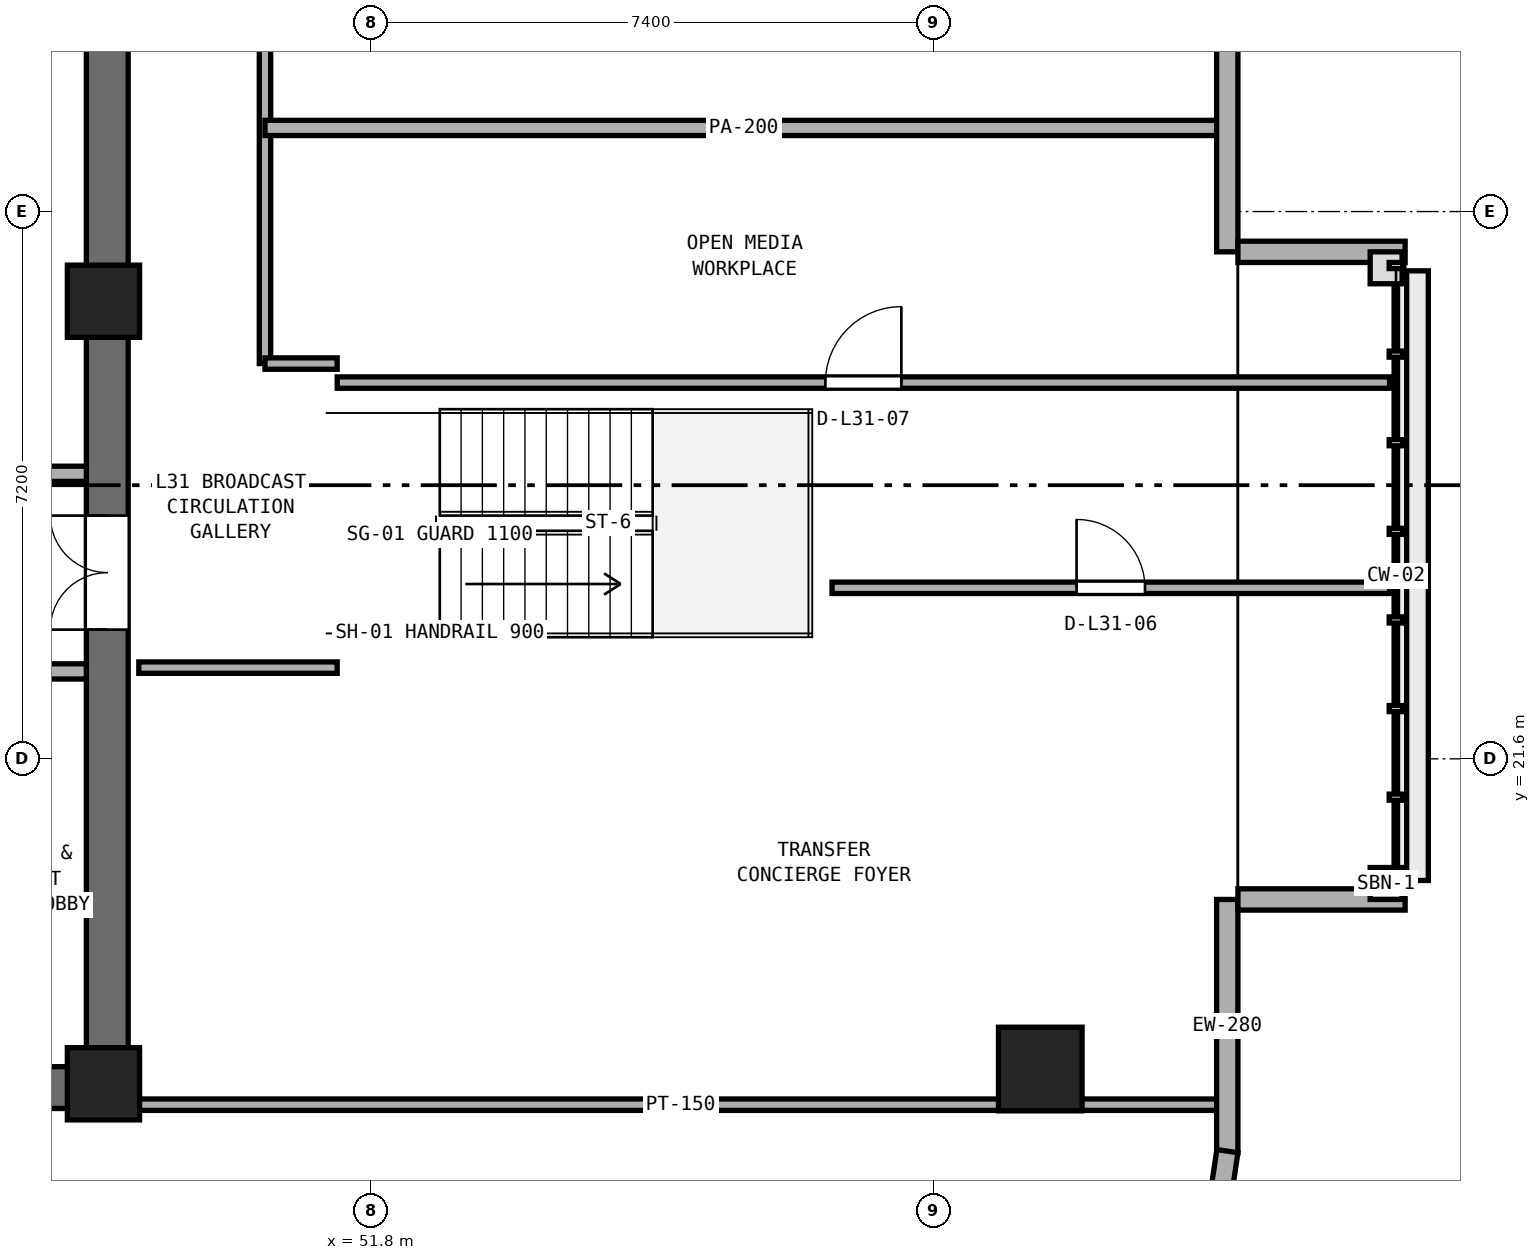
"""IFC4 building model, lengths in metres.
Left out: names, types, materials, properties, quantities, classifications, styles, units other than length and angle.
Written with IfcOpenShell. Run it as: python <this file> out.ifc"""

import sys

from ifc_helpers import new_model, si_unit, direction, frame, frame_2d, origin, origin_2d, place, context, subcontext, project, spatial, rectangle, extrude, element, fill, save


model = new_model("IFC4")
c1 = context("Model", 3, precision=1e-05, world=origin(), true_north=direction((0.0, 1.0)))
c2 = subcontext(c1, "Body", "Model", "MODEL_VIEW")
j1 = project(units=[si_unit("LENGTHUNIT", "METRE"), si_unit("PLANEANGLEUNIT", "RADIAN")], contexts=[c1])
p1 = place(None, origin())
s1 = spatial("IfcSite", under=j1, at=p1, CompositionType="ELEMENT")
p2 = place(p1, origin())
s2 = spatial("IfcBuilding", under=s1, at=p2, CompositionType="ELEMENT")
p3 = place(p2, frame((0.0, 0.0, 125.0)))
s3 = spatial("IfcBuildingStorey", under=s2, at=p3, CompositionType="ELEMENT", Elevation=125.0)
p4 = place(p3, frame((25.4, 17.275, 0.0), z_axis=(0.0, 0.0, 1.0), x_axis=(1.0, 0.0, 0.0)))
e1 = element("IfcWall", 1, at=p4, inside=s3, PredefinedType="SHEAR", context=c2, shape_type="SweptSolid", body=[
    extrude(rectangle(XDim=23.2, YDim=0.55, at=frame_2d((11.6, 0.0))), origin(), (0.0, 0.0, 1.0), 3.54),
])
p5 = place(p3, frame((48.325, 17.55, 0.0), z_axis=(0.0, 0.0, 1.0), x_axis=(0.0, 1.0, 0.0)))
e2 = element("IfcWall", 2, at=p5, inside=s3, PredefinedType="SHEAR", context=c2, shape_type="SweptSolid", body=[
    extrude(rectangle(XDim=15.3, YDim=0.55, at=frame_2d((7.65, 0.0))), origin(), (0.0, 0.0, 1.0), 3.54),
])
p6 = place(p5, frame((5.75, 0.0, 0.0)))
e3 = element("IfcOpeningElement", 3, at=p6, cuts=e2, PredefinedType="OPENING", context=c2, shape_type="SweptSolid", body=[
    extrude(rectangle(XDim=1.5, YDim=2.15, at=frame_2d((0.75, 1.075))), frame((0.0, 0.285, 0.0), z_axis=(0.0, -1.0, 0.0), x_axis=(1.0, 0.0, 0.0)), (0.0, 0.0, 1.0), 0.57),
])
for number, where, z_axis, x_axis in (
    (4, (48.275, 17.325, 0.0), (0.0, 0.0, 1.0), (1.0, 0.0, 0.0)),
    (5, (48.275, 27.62, 0.0), (0.0, 0.0, 1.0), (1.0, 0.0, 0.0)),
):
    element("IfcColumn", number, at=place(p3, frame(where, z_axis=z_axis, x_axis=x_axis)), inside=s3, PredefinedType="PILASTER", context=c2, shape_type="SweptSolid", body=[
        extrude(rectangle(XDim=0.95, YDim=0.95, at=origin_2d()), origin(), (0.0, 0.0, 1.0), 3.8),
    ])
p7 = place(p3, frame((60.6, 17.519, 0.0), z_axis=(0.0, 0.0, 1.0), x_axis=(1.0, 0.0, 0.0)))
e6 = element("IfcColumn", 6, at=p7, inside=s3, PredefinedType="COLUMN", context=c2, shape_type="SweptSolid", body=[
    extrude(rectangle(XDim=1.1, YDim=1.1, at=origin_2d()), origin(), (0.0, 0.0, 1.0), 3.8),
])
p8 = place(p3, frame((42.0, 22.75, 0.0), z_axis=(0.0, 0.0, 1.0), x_axis=(1.0, 0.0, 0.0)))
e7 = element("IfcWall", 7, at=p8, inside=s3, PredefinedType="SOLIDWALL", context=c2, shape_type="SweptSolid", body=[
    extrude(rectangle(XDim=6.05, YDim=0.2, at=frame_2d((3.025, 0.0))), origin(), (0.0, 0.0, 1.0), 3.54),
])
p9 = place(p3, frame((46.1, 25.35, 0.0), z_axis=(0.0, 0.0, 1.0), x_axis=(1.0, 0.0, 0.0)))
e8 = element("IfcWall", 8, at=p9, inside=s3, PredefinedType="SOLIDWALL", context=c2, shape_type="SweptSolid", body=[
    extrude(rectangle(XDim=1.95, YDim=0.2, at=frame_2d((0.975, 0.0))), origin(), (0.0, 0.0, 1.0), 3.54),
])
p10 = place(p3, frame((50.4, 26.8, 0.0), z_axis=(0.0, 0.0, 1.0), x_axis=(0.0, 1.0, 0.0)))
e9 = element("IfcWall", 9, at=p10, inside=s3, PredefinedType="PARTITIONING", context=c2, shape_type="SweptSolid", body=[
    extrude(rectangle(XDim=8.4, YDim=0.15, at=frame_2d((4.2, 0.0))), origin(), (0.0, 0.0, 1.0), 3.54),
])
p11 = place(p10, frame((4.375, 0.0, 0.0)))
e10 = element("IfcOpeningElement", 10, at=p11, cuts=e9, PredefinedType="OPENING", context=c2, shape_type="SweptSolid", body=[
    extrude(rectangle(XDim=0.9, YDim=2.1, at=frame_2d((0.45, 1.05))), frame((0.0, 0.085, 0.0), z_axis=(0.0, -1.0, 0.0), x_axis=(1.0, 0.0, 0.0)), (0.0, 0.0, 1.0), 0.17),
])
p12 = place(p3, frame((48.74, 17.05, 0.0), z_axis=(0.0, 0.0, 1.0), x_axis=(1.0, 0.0, 0.0)))
e11 = element("IfcWall", 11, at=p12, inside=s3, PredefinedType="PARTITIONING", context=c2, shape_type="SweptSolid", body=[
    extrude(rectangle(XDim=14.255, YDim=0.15, at=frame_2d((7.127, 0.0))), origin(), (0.0, 0.0, 1.0), 2.79),
])
p13 = place(p3, frame((48.74, 22.8, 0.0), z_axis=(0.0, 0.0, 1.0), x_axis=(1.0, 0.0, 0.0)))
e12 = element("IfcWall", 12, at=p13, inside=s3, PredefinedType="PARTITIONING", context=c2, shape_type="SweptSolid", body=[
    extrude(rectangle(XDim=2.61, YDim=0.15, at=frame_2d((1.305, 0.0))), origin(), (0.0, 0.0, 1.0), 3.54),
])
p14 = place(p3, frame((57.86, 23.85, 0.0), z_axis=(0.0, 0.0, 1.0), x_axis=(1.0, 0.0, 0.0)))
e13 = element("IfcWall", 13, at=p14, inside=s3, PredefinedType="PARTITIONING", context=c2, shape_type="SweptSolid", body=[
    extrude(rectangle(XDim=7.335, YDim=0.15, at=frame_2d((3.667, 0.0))), origin(), (0.0, 0.0, 1.0), 3.54),
])
p15 = place(p14, frame((3.218, 0.0, 0.0)))
e14 = element("IfcOpeningElement", 14, at=p15, cuts=e13, PredefinedType="OPENING", context=c2, shape_type="SweptSolid", body=[
    extrude(rectangle(XDim=0.9, YDim=2.1, at=frame_2d((0.45, 1.05))), frame((0.0, 0.085, 0.0), z_axis=(0.0, -1.0, 0.0), x_axis=(1.0, 0.0, 0.0)), (0.0, 0.0, 1.0), 0.17),
])
p16 = place(p3, frame((51.35, 26.55, 0.0), z_axis=(0.0, 0.0, 1.0), x_axis=(1.0, 0.0, 0.0)))
e15 = element("IfcWall", 15, at=p16, inside=s3, PredefinedType="PARTITIONING", context=c2, shape_type="SweptSolid", body=[
    extrude(rectangle(XDim=13.845, YDim=0.15, at=frame_2d((6.922, 0.0))), origin(), (0.0, 0.0, 1.0), 3.54),
])
p17 = place(p16, frame((6.423, 0.0, 0.0)))
e16 = element("IfcOpeningElement", 16, at=p17, cuts=e15, PredefinedType="OPENING", context=c2, shape_type="SweptSolid", body=[
    extrude(rectangle(XDim=1.0, YDim=2.12, at=frame_2d((0.5, 1.06))), frame((0.0, 0.085, 0.0), z_axis=(0.0, -1.0, 0.0), x_axis=(1.0, 0.0, 0.0)), (0.0, 0.0, 1.0), 0.17),
])
p18 = place(p3, frame((50.4, 26.8, 0.0), z_axis=(0.0, 0.0, 1.0), x_axis=(1.0, 0.0, 0.0)))
e17 = element("IfcWall", 17, at=p18, inside=s3, PredefinedType="PARTITIONING", context=c2, shape_type="SweptSolid", body=[
    extrude(rectangle(XDim=0.95, YDim=0.15, at=frame_2d((0.475, 0.0))), origin(), (0.0, 0.0, 1.0), 3.54),
])
p19 = place(p3, frame((50.4, 29.9, 0.0), z_axis=(0.0, 0.0, 1.0), x_axis=(1.0, 0.0, 0.0)))
e18 = element("IfcWall", 18, at=p19, inside=s3, PredefinedType="PARTITIONING", context=c2, shape_type="SweptSolid", body=[
    extrude(rectangle(XDim=12.595, YDim=0.2, at=frame_2d((6.298, 0.0))), origin(), (0.0, 0.0, 1.0), 3.54),
])
p20 = place(p3, frame((63.06, 16.418, 0.0), z_axis=(0.0, 0.0, 1.0), x_axis=(0.0, 1.0, 0.0)))
e19 = element("IfcWall", 19, at=p20, inside=s3, PredefinedType="STANDARD", context=c2, shape_type="SweptSolid", body=[
    extrude(rectangle(XDim=3.332, YDim=0.28, at=frame_2d((1.666, 0.0))), origin(), (0.0, 0.0, 1.0), 3.54),
])
p21 = place(p3, frame((63.06, 28.27, 0.0), z_axis=(0.0, 0.0, 1.0), x_axis=(0.0, 1.0, 0.0)))
e20 = element("IfcWall", 20, at=p21, inside=s3, PredefinedType="STANDARD", context=c2, shape_type="SweptSolid", body=[
    extrude(rectangle(XDim=6.96, YDim=0.28, at=frame_2d((3.48, 0.0))), origin(), (0.0, 0.0, 1.0), 3.54),
])
p22 = place(p3, frame((62.894, 15.307, 0.0), z_axis=(0.0, 0.0, 1.0), x_axis=(0.146796104284, 0.989166772474, 0.0)))
e21 = element("IfcWall", 21, at=p22, inside=s3, PredefinedType="STANDARD", context=c2, shape_type="SweptSolid", body=[
    extrude(rectangle(XDim=1.144, YDim=0.28, at=frame_2d((0.572, 0.0))), origin(), (0.0, 0.0, 1.0), 3.54),
])
p23 = place(p3, frame((63.2, 19.75, 0.0), z_axis=(0.0, 0.0, 1.0), x_axis=(1.0, 0.0, 0.0)))
e22 = element("IfcWall", 22, at=p23, inside=s3, PredefinedType="STANDARD", context=c2, shape_type="SweptSolid", body=[
    extrude(rectangle(XDim=2.2, YDim=0.28, at=frame_2d((1.1, 0.0))), origin(), (0.0, 0.0, 1.0), 2.847),
])
p24 = place(p3, frame((63.2, 28.27, 0.0), z_axis=(0.0, 0.0, 1.0), x_axis=(1.0, 0.0, 0.0)))
e23 = element("IfcWall", 23, at=p24, inside=s3, PredefinedType="STANDARD", context=c2, shape_type="SweptSolid", body=[
    extrude(rectangle(XDim=2.2, YDim=0.28, at=frame_2d((1.1, 0.0))), origin(), (0.0, 0.0, 1.0), 3.54),
])
p25 = place(p6, origin())
e24 = element("IfcDoor", 24, at=p25, inside=s3, OperationType="DOUBLE_DOOR_SINGLE_SWING", PredefinedType="DOOR", context=c2, shape_type="SweptSolid", body=[
    extrude(rectangle(XDim=1.5, YDim=2.15, at=frame_2d((0.75, 1.075))), frame((0.0, 0.025, 0.0), z_axis=(0.0, -1.0, 0.0), x_axis=(1.0, 0.0, 0.0)), (0.0, 0.0, 1.0), 0.05),
])
fill(e3, e24)
p26 = place(p15, origin())
e25 = element("IfcDoor", 25, at=p26, inside=s3, OperationType="SINGLE_SWING_LEFT", PredefinedType="DOOR", context=c2, shape_type="SweptSolid", body=[
    extrude(rectangle(XDim=0.9, YDim=2.1, at=frame_2d((0.45, 1.05))), frame((0.0, 0.025, 0.0), z_axis=(0.0, -1.0, 0.0), x_axis=(1.0, 0.0, 0.0)), (0.0, 0.0, 1.0), 0.05),
])
fill(e14, e25)
p27 = place(p17, origin())
e26 = element("IfcDoor", 26, at=p27, inside=s3, OperationType="SINGLE_SWING_RIGHT", PredefinedType="DOOR", context=c2, shape_type="SweptSolid", body=[
    extrude(rectangle(XDim=1.0, YDim=2.12, at=frame_2d((0.5, 1.06))), frame((0.0, 0.025, 0.0), z_axis=(0.0, -1.0, 0.0), x_axis=(1.0, 0.0, 0.0)), (0.0, 0.0, 1.0), 0.05),
])
fill(e16, e26)
save(model, sys.argv[1])
